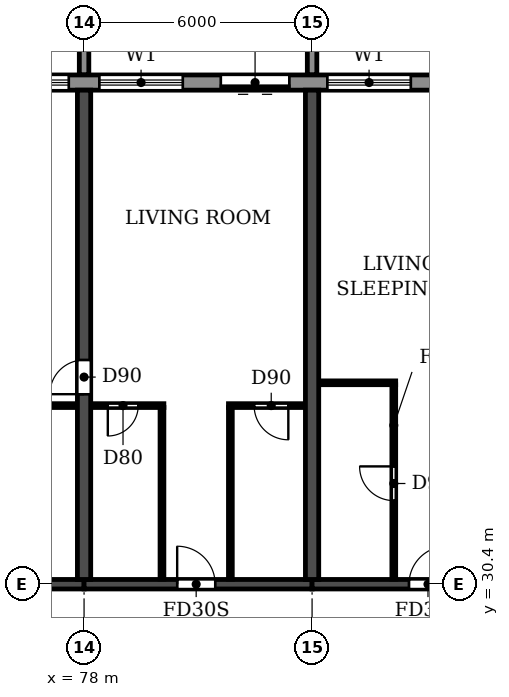
"""IFC4 building model, lengths in metres.
Left out: names, types, materials, properties, quantities, classifications, styles, units other than length and angle.
Written with IfcOpenShell. Run it as: python <this file> out.ifc"""

import sys

from ifc_helpers import new_model, si_unit, direction, frame, frame_2d, origin, place, context, subcontext, project, spatial, polyline, rectangle, outline, extrude, source, transform, mapped, element, fill, save


model = new_model("IFC4")
c1 = context("Model", 3, precision=1e-05, world=origin(), true_north=direction((0.0, 1.0)))
c2 = subcontext(c1, "Body", "Model", "MODEL_VIEW")
j1 = project(units=[si_unit("LENGTHUNIT", "METRE"), si_unit("PLANEANGLEUNIT", "RADIAN")], contexts=[c1])
p1 = place(None, origin())
s1 = spatial("IfcSite", under=j1, at=p1, CompositionType="ELEMENT")
p2 = place(p1, origin())
s2 = spatial("IfcBuilding", under=s1, at=p2, CompositionType="ELEMENT")
p3 = place(p2, frame((0.0, 0.0, 76.2)))
s3 = spatial("IfcBuildingStorey", under=s2, at=p3, CompositionType="ELEMENT", Elevation=76.2)
p4 = place(p3, frame((78.0, 30.525, 0.0), z_axis=(0.0, 0.0, 1.0), x_axis=(0.0, 1.0, 0.0)))
e1 = element("IfcWall", 1, at=p4, inside=s3, PredefinedType="SHEAR", context=c2, shape_type="SweptSolid", body=[
    extrude(rectangle(XDim=12.875, YDim=0.35, at=frame_2d((6.438, 0.0))), origin(), (0.0, 0.0, 1.0), 3.06),
])
p5 = place(p4, frame((4.875, 0.0, 0.0)))
e2 = element("IfcOpeningElement", 2, at=p5, cuts=e1, PredefinedType="OPENING", context=c2, shape_type="SweptSolid", body=[
    extrude(rectangle(XDim=0.9, YDim=2.1, at=frame_2d((0.45, 1.05))), frame((0.0, 0.185, 0.0), z_axis=(0.0, -1.0, 0.0), x_axis=(1.0, 0.0, 0.0)), (0.0, 0.0, 1.0), 0.37),
])
p6 = place(p3, frame((84.0, 30.525, 0.0), z_axis=(0.0, 0.0, 1.0), x_axis=(0.0, 1.0, 0.0)))
e3 = element("IfcWall", 3, at=p6, inside=s3, PredefinedType="SHEAR", context=c2, shape_type="SweptSolid", body=[
    extrude(rectangle(XDim=12.875, YDim=0.35, at=frame_2d((6.438, 0.0))), origin(), (0.0, 0.0, 1.0), 3.06),
])
p7 = place(p3, frame((72.0, 30.4, 0.0), z_axis=(0.0, 0.0, 1.0), x_axis=(1.0, 0.0, 0.0)))
e4 = element("IfcWall", 4, at=p7, inside=s3, PredefinedType="SHEAR", context=c2, shape_type="SweptSolid", body=[
    extrude(rectangle(XDim=6.0, YDim=0.25, at=frame_2d((3.0, 0.0))), origin(), (0.0, 0.0, 1.0), 2.46),
])
p8 = place(p3, frame((78.0, 30.4, 0.0), z_axis=(0.0, 0.0, 1.0), x_axis=(1.0, 0.0, 0.0)))
e5 = element("IfcWall", 5, at=p8, inside=s3, PredefinedType="SHEAR", context=c2, shape_type="SweptSolid", body=[
    extrude(rectangle(XDim=6.0, YDim=0.25, at=frame_2d((3.0, 0.0))), origin(), (0.0, 0.0, 1.0), 2.46),
])
p9 = place(p8, frame((2.45, 0.0, 0.0)))
e6 = element("IfcOpeningElement", 6, at=p9, cuts=e5, PredefinedType="OPENING", context=c2, shape_type="SweptSolid", body=[
    extrude(rectangle(XDim=1.0, YDim=2.1, at=frame_2d((0.5, 1.05))), frame((0.0, 0.135, 0.0), z_axis=(0.0, -1.0, 0.0), x_axis=(1.0, 0.0, 0.0)), (0.0, 0.0, 1.0), 0.27),
])
p10 = place(p3, frame((84.0, 30.4, 0.0), z_axis=(0.0, 0.0, 1.0), x_axis=(1.0, 0.0, 0.0)))
e7 = element("IfcWall", 7, at=p10, inside=s3, PredefinedType="SHEAR", context=c2, shape_type="SweptSolid", body=[
    extrude(rectangle(XDim=6.0, YDim=0.25, at=frame_2d((3.0, 0.0))), origin(), (0.0, 0.0, 1.0), 2.46),
])
p11 = place(p10, frame((2.55, 0.0, 0.0)))
e8 = element("IfcOpeningElement", 8, at=p11, cuts=e7, PredefinedType="OPENING", context=c2, shape_type="SweptSolid", body=[
    extrude(rectangle(XDim=1.0, YDim=2.1, at=frame_2d((0.5, 1.05))), frame((0.0, 0.135, 0.0), z_axis=(0.0, -1.0, 0.0), x_axis=(1.0, 0.0, 0.0)), (0.0, 0.0, 1.0), 0.27),
])
p12 = place(p3, frame((91.317, 43.6, 0.0), z_axis=(0.0, 0.0, 1.0), x_axis=(-1.0, 0.0, 0.0)))
e9 = element("IfcWall", 9, at=p12, inside=s3, PredefinedType="STANDARD", context=c2, shape_type="SweptSolid", body=[
    extrude(rectangle(XDim=80.634, YDim=0.4, at=frame_2d((40.317, 0.0))), origin(), (0.0, 0.0, 1.0), 3.06),
])
p13 = place(p12, frame((76.717, 0.0, 0.9)))
e10 = element("IfcOpeningElement", 10, at=p13, cuts=e9, PredefinedType="OPENING", context=c2, shape_type="SweptSolid", body=[
    extrude(rectangle(XDim=2.2, YDim=1.5, at=frame_2d((1.1, 0.75))), frame((0.0, 0.21, 0.0), z_axis=(0.0, -1.0, 0.0), x_axis=(1.0, 0.0, 0.0)), (0.0, 0.0, 1.0), 0.42),
])
p14 = place(p12, frame((73.917, 0.0, 0.0)))
e11 = element("IfcOpeningElement", 11, at=p14, cuts=e9, PredefinedType="OPENING", context=c2, shape_type="SweptSolid", body=[
    extrude(rectangle(XDim=1.8, YDim=2.4, at=frame_2d((0.9, 1.2))), frame((0.0, 0.21, 0.0), z_axis=(0.0, -1.0, 0.0), x_axis=(1.0, 0.0, 0.0)), (0.0, 0.0, 1.0), 0.42),
])
p15 = place(p12, frame((70.917, 0.0, 0.0)))
e12 = element("IfcOpeningElement", 12, at=p15, cuts=e9, PredefinedType="OPENING", context=c2, shape_type="SweptSolid", body=[
    extrude(rectangle(XDim=1.8, YDim=2.4, at=frame_2d((0.9, 1.2))), frame((0.0, 0.21, 0.0), z_axis=(0.0, -1.0, 0.0), x_axis=(1.0, 0.0, 0.0)), (0.0, 0.0, 1.0), 0.42),
])
p16 = place(p12, frame((67.717, 0.0, 0.9)))
e13 = element("IfcOpeningElement", 13, at=p16, cuts=e9, PredefinedType="OPENING", context=c2, shape_type="SweptSolid", body=[
    extrude(rectangle(XDim=2.2, YDim=1.5, at=frame_2d((1.1, 0.75))), frame((0.0, 0.21, 0.0), z_axis=(0.0, -1.0, 0.0), x_axis=(1.0, 0.0, 0.0)), (0.0, 0.0, 1.0), 0.42),
])
p17 = place(p12, frame((64.717, 0.0, 0.9)))
e14 = element("IfcOpeningElement", 14, at=p17, cuts=e9, PredefinedType="OPENING", context=c2, shape_type="SweptSolid", body=[
    extrude(rectangle(XDim=2.2, YDim=1.5, at=frame_2d((1.1, 0.75))), frame((0.0, 0.21, 0.0), z_axis=(0.0, -1.0, 0.0), x_axis=(1.0, 0.0, 0.0)), (0.0, 0.0, 1.0), 0.42),
])
p18 = place(p12, frame((61.917, 0.0, 0.0)))
e15 = element("IfcOpeningElement", 15, at=p18, cuts=e9, PredefinedType="OPENING", context=c2, shape_type="SweptSolid", body=[
    extrude(rectangle(XDim=1.8, YDim=2.4, at=frame_2d((0.9, 1.2))), frame((0.0, 0.21, 0.0), z_axis=(0.0, -1.0, 0.0), x_axis=(1.0, 0.0, 0.0)), (0.0, 0.0, 1.0), 0.42),
])
p19 = place(p12, frame((58.717, 0.0, 0.9)))
e16 = element("IfcOpeningElement", 16, at=p19, cuts=e9, PredefinedType="OPENING", context=c2, shape_type="SweptSolid", body=[
    extrude(rectangle(XDim=2.2, YDim=1.5, at=frame_2d((1.1, 0.75))), frame((0.0, 0.21, 0.0), z_axis=(0.0, -1.0, 0.0), x_axis=(1.0, 0.0, 0.0)), (0.0, 0.0, 1.0), 0.42),
])
p20 = place(p12, frame((55.917, 0.0, 0.0)))
e17 = element("IfcOpeningElement", 17, at=p20, cuts=e9, PredefinedType="OPENING", context=c2, shape_type="SweptSolid", body=[
    extrude(rectangle(XDim=1.8, YDim=2.4, at=frame_2d((0.9, 1.2))), frame((0.0, 0.21, 0.0), z_axis=(0.0, -1.0, 0.0), x_axis=(1.0, 0.0, 0.0)), (0.0, 0.0, 1.0), 0.42),
])
p21 = place(p12, frame((52.717, 0.0, 0.9)))
e18 = element("IfcOpeningElement", 18, at=p21, cuts=e9, PredefinedType="OPENING", context=c2, shape_type="SweptSolid", body=[
    extrude(rectangle(XDim=2.2, YDim=1.5, at=frame_2d((1.1, 0.75))), frame((0.0, 0.21, 0.0), z_axis=(0.0, -1.0, 0.0), x_axis=(1.0, 0.0, 0.0)), (0.0, 0.0, 1.0), 0.42),
])
p22 = place(p12, frame((49.717, 0.0, 0.9)))
e19 = element("IfcOpeningElement", 19, at=p22, cuts=e9, PredefinedType="OPENING", context=c2, shape_type="SweptSolid", body=[
    extrude(rectangle(XDim=2.2, YDim=1.5, at=frame_2d((1.1, 0.75))), frame((0.0, 0.21, 0.0), z_axis=(0.0, -1.0, 0.0), x_axis=(1.0, 0.0, 0.0)), (0.0, 0.0, 1.0), 0.42),
])
p23 = place(p12, frame((46.917, 0.0, 0.0)))
e20 = element("IfcOpeningElement", 20, at=p23, cuts=e9, PredefinedType="OPENING", context=c2, shape_type="SweptSolid", body=[
    extrude(rectangle(XDim=1.8, YDim=2.4, at=frame_2d((0.9, 1.2))), frame((0.0, 0.21, 0.0), z_axis=(0.0, -1.0, 0.0), x_axis=(1.0, 0.0, 0.0)), (0.0, 0.0, 1.0), 0.42),
])
p24 = place(p12, frame((43.717, 0.0, 0.9)))
e21 = element("IfcOpeningElement", 21, at=p24, cuts=e9, PredefinedType="OPENING", context=c2, shape_type="SweptSolid", body=[
    extrude(rectangle(XDim=2.2, YDim=1.5, at=frame_2d((1.1, 0.75))), frame((0.0, 0.21, 0.0), z_axis=(0.0, -1.0, 0.0), x_axis=(1.0, 0.0, 0.0)), (0.0, 0.0, 1.0), 0.42),
])
p25 = place(p12, frame((40.717, 0.0, 0.9)))
e22 = element("IfcOpeningElement", 22, at=p25, cuts=e9, PredefinedType="OPENING", context=c2, shape_type="SweptSolid", body=[
    extrude(rectangle(XDim=2.2, YDim=1.5, at=frame_2d((1.1, 0.75))), frame((0.0, 0.21, 0.0), z_axis=(0.0, -1.0, 0.0), x_axis=(1.0, 0.0, 0.0)), (0.0, 0.0, 1.0), 0.42),
])
p26 = place(p12, frame((37.917, 0.0, 0.0)))
e23 = element("IfcOpeningElement", 23, at=p26, cuts=e9, PredefinedType="OPENING", context=c2, shape_type="SweptSolid", body=[
    extrude(rectangle(XDim=1.8, YDim=2.4, at=frame_2d((0.9, 1.2))), frame((0.0, 0.21, 0.0), z_axis=(0.0, -1.0, 0.0), x_axis=(1.0, 0.0, 0.0)), (0.0, 0.0, 1.0), 0.42),
])
p27 = place(p12, frame((34.717, 0.0, 0.9)))
e24 = element("IfcOpeningElement", 24, at=p27, cuts=e9, PredefinedType="OPENING", context=c2, shape_type="SweptSolid", body=[
    extrude(rectangle(XDim=2.2, YDim=1.5, at=frame_2d((1.1, 0.75))), frame((0.0, 0.21, 0.0), z_axis=(0.0, -1.0, 0.0), x_axis=(1.0, 0.0, 0.0)), (0.0, 0.0, 1.0), 0.42),
])
p28 = place(p12, frame((31.917, 0.0, 0.0)))
e25 = element("IfcOpeningElement", 25, at=p28, cuts=e9, PredefinedType="OPENING", context=c2, shape_type="SweptSolid", body=[
    extrude(rectangle(XDim=1.8, YDim=2.4, at=frame_2d((0.9, 1.2))), frame((0.0, 0.21, 0.0), z_axis=(0.0, -1.0, 0.0), x_axis=(1.0, 0.0, 0.0)), (0.0, 0.0, 1.0), 0.42),
])
p29 = place(p12, frame((28.717, 0.0, 0.9)))
e26 = element("IfcOpeningElement", 26, at=p29, cuts=e9, PredefinedType="OPENING", context=c2, shape_type="SweptSolid", body=[
    extrude(rectangle(XDim=2.2, YDim=1.5, at=frame_2d((1.1, 0.75))), frame((0.0, 0.21, 0.0), z_axis=(0.0, -1.0, 0.0), x_axis=(1.0, 0.0, 0.0)), (0.0, 0.0, 1.0), 0.42),
])
p30 = place(p12, frame((25.717, 0.0, 0.9)))
e27 = element("IfcOpeningElement", 27, at=p30, cuts=e9, PredefinedType="OPENING", context=c2, shape_type="SweptSolid", body=[
    extrude(rectangle(XDim=2.2, YDim=1.5, at=frame_2d((1.1, 0.75))), frame((0.0, 0.21, 0.0), z_axis=(0.0, -1.0, 0.0), x_axis=(1.0, 0.0, 0.0)), (0.0, 0.0, 1.0), 0.42),
])
p31 = place(p12, frame((22.717, 0.0, 0.9)))
e28 = element("IfcOpeningElement", 28, at=p31, cuts=e9, PredefinedType="OPENING", context=c2, shape_type="SweptSolid", body=[
    extrude(rectangle(XDim=2.2, YDim=1.5, at=frame_2d((1.1, 0.75))), frame((0.0, 0.21, 0.0), z_axis=(0.0, -1.0, 0.0), x_axis=(1.0, 0.0, 0.0)), (0.0, 0.0, 1.0), 0.42),
])
p32 = place(p12, frame((19.917, 0.0, 0.0)))
e29 = element("IfcOpeningElement", 29, at=p32, cuts=e9, PredefinedType="OPENING", context=c2, shape_type="SweptSolid", body=[
    extrude(rectangle(XDim=1.8, YDim=2.4, at=frame_2d((0.9, 1.2))), frame((0.0, 0.21, 0.0), z_axis=(0.0, -1.0, 0.0), x_axis=(1.0, 0.0, 0.0)), (0.0, 0.0, 1.0), 0.42),
])
p33 = place(p12, frame((16.717, 0.0, 0.9)))
e30 = element("IfcOpeningElement", 30, at=p33, cuts=e9, PredefinedType="OPENING", context=c2, shape_type="SweptSolid", body=[
    extrude(rectangle(XDim=2.2, YDim=1.5, at=frame_2d((1.1, 0.75))), frame((0.0, 0.21, 0.0), z_axis=(0.0, -1.0, 0.0), x_axis=(1.0, 0.0, 0.0)), (0.0, 0.0, 1.0), 0.42),
])
p34 = place(p12, frame((13.717, 0.0, 0.9)))
e31 = element("IfcOpeningElement", 31, at=p34, cuts=e9, PredefinedType="OPENING", context=c2, shape_type="SweptSolid", body=[
    extrude(rectangle(XDim=2.2, YDim=1.5, at=frame_2d((1.1, 0.75))), frame((0.0, 0.21, 0.0), z_axis=(0.0, -1.0, 0.0), x_axis=(1.0, 0.0, 0.0)), (0.0, 0.0, 1.0), 0.42),
])
p35 = place(p12, frame((10.717, 0.0, 0.9)))
e32 = element("IfcOpeningElement", 32, at=p35, cuts=e9, PredefinedType="OPENING", context=c2, shape_type="SweptSolid", body=[
    extrude(rectangle(XDim=2.2, YDim=1.5, at=frame_2d((1.1, 0.75))), frame((0.0, 0.21, 0.0), z_axis=(0.0, -1.0, 0.0), x_axis=(1.0, 0.0, 0.0)), (0.0, 0.0, 1.0), 0.42),
])
p36 = place(p12, frame((7.917, 0.0, 0.0)))
e33 = element("IfcOpeningElement", 33, at=p36, cuts=e9, PredefinedType="OPENING", context=c2, shape_type="SweptSolid", body=[
    extrude(rectangle(XDim=1.8, YDim=2.4, at=frame_2d((0.9, 1.2))), frame((0.0, 0.21, 0.0), z_axis=(0.0, -1.0, 0.0), x_axis=(1.0, 0.0, 0.0)), (0.0, 0.0, 1.0), 0.42),
])
p37 = place(p12, frame((4.717, 0.0, 0.9)))
e34 = element("IfcOpeningElement", 34, at=p37, cuts=e9, PredefinedType="OPENING", context=c2, shape_type="SweptSolid", body=[
    extrude(rectangle(XDim=2.2, YDim=1.5, at=frame_2d((1.1, 0.75))), frame((0.0, 0.21, 0.0), z_axis=(0.0, -1.0, 0.0), x_axis=(1.0, 0.0, 0.0)), (0.0, 0.0, 1.0), 0.42),
])
p38 = place(p12, frame((1.917, 0.0, 0.0)))
e35 = element("IfcOpeningElement", 35, at=p38, cuts=e9, PredefinedType="OPENING", context=c2, shape_type="SweptSolid", body=[
    extrude(rectangle(XDim=1.8, YDim=2.4, at=frame_2d((0.9, 1.2))), frame((0.0, 0.21, 0.0), z_axis=(0.0, -1.0, 0.0), x_axis=(1.0, 0.0, 0.0)), (0.0, 0.0, 1.0), 0.42),
])
m1 = source(origin(), c2, "Body", "SweptSolid", [
    extrude(outline(polyline([(0.0, 0.0), (0.25, 0.0), (0.25, 3.1), (0.0, 3.1), (0.0, 0.0)])), origin(), (0.0, 0.0, 1.0), 3.1),
])
for number, where in (
    (36, (77.875, 43.8, 0.0)),
    (37, (83.875, 43.8, 0.0)),
):
    element("IfcWall", number, at=place(p3, frame(where)), inside=s3, PredefinedType="STANDARD", context=c2, shape_type="MappedRepresentation", body=[
        mapped(m1, transform((0.0, 0.0, 0.0))),
    ])
p39 = place(p3, frame((75.1, 35.1, 0.0), z_axis=(0.0, 0.0, 1.0), x_axis=(1.0, 0.0, 0.0)))
e38 = element("IfcWall", 38, at=p39, inside=s3, PredefinedType="PARTITIONING", context=c2, shape_type="SweptSolid", body=[
    extrude(rectangle(XDim=2.715, YDim=0.1, at=frame_2d((1.357, 0.0))), origin(), (0.0, 0.0, 1.0), 3.06),
])
p40 = place(p39, frame((1.0, 0.0, 0.0)))
e39 = element("IfcOpeningElement", 39, at=p40, cuts=e38, PredefinedType="OPENING", context=c2, shape_type="SweptSolid", body=[
    extrude(rectangle(XDim=0.8, YDim=2.1, at=frame_2d((0.4, 1.05))), frame((0.0, 0.06, 0.0), z_axis=(0.0, -1.0, 0.0), x_axis=(1.0, 0.0, 0.0)), (0.0, 0.0, 1.0), 0.12),
])
p41 = place(p3, frame((78.185, 35.1, 0.0), z_axis=(0.0, 0.0, 1.0), x_axis=(1.0, 0.0, 0.0)))
e40 = element("IfcWall", 40, at=p41, inside=s3, PredefinedType="PARTITIONING", context=c2, shape_type="SweptSolid", body=[
    extrude(rectangle(XDim=1.915, YDim=0.1, at=frame_2d((0.958, 0.0))), origin(), (0.0, 0.0, 1.0), 3.06),
])
p42 = place(p41, frame((0.44, 0.0, 0.0)))
e41 = element("IfcOpeningElement", 41, at=p42, cuts=e40, PredefinedType="OPENING", context=c2, shape_type="SweptSolid", body=[
    extrude(rectangle(XDim=0.8, YDim=2.1, at=frame_2d((0.4, 1.05))), frame((0.0, 0.06, 0.0), z_axis=(0.0, -1.0, 0.0), x_axis=(1.0, 0.0, 0.0)), (0.0, 0.0, 1.0), 0.12),
])
p43 = place(p3, frame((81.8, 35.1, 0.0), z_axis=(0.0, 0.0, 1.0), x_axis=(1.0, 0.0, 0.0)))
e42 = element("IfcWall", 42, at=p43, inside=s3, PredefinedType="PARTITIONING", context=c2, shape_type="SweptSolid", body=[
    extrude(rectangle(XDim=2.015, YDim=0.1, at=frame_2d((1.007, 0.0))), origin(), (0.0, 0.0, 1.0), 3.06),
])
p44 = place(p43, frame((0.675, 0.0, 0.0)))
e43 = element("IfcOpeningElement", 43, at=p44, cuts=e42, PredefinedType="OPENING", context=c2, shape_type="SweptSolid", body=[
    extrude(rectangle(XDim=0.9, YDim=2.1, at=frame_2d((0.45, 1.05))), frame((0.0, 0.06, 0.0), z_axis=(0.0, -1.0, 0.0), x_axis=(1.0, 0.0, 0.0)), (0.0, 0.0, 1.0), 0.12),
])
p45 = place(p3, frame((84.185, 35.7, 0.0), z_axis=(0.0, 0.0, 1.0), x_axis=(1.0, 0.0, 0.0)))
e44 = element("IfcWall", 44, at=p45, inside=s3, PredefinedType="PARTITIONING", context=c2, shape_type="SweptSolid", body=[
    extrude(rectangle(XDim=2.015, YDim=0.1, at=frame_2d((1.007, 0.0))), origin(), (0.0, 0.0, 1.0), 3.06),
])
for number, where, z_axis, x_axis in (
    (45, (80.05, 30.535, 0.0), (0.0, 0.0, 1.0), (0.0, 1.0, 0.0)),
    (46, (81.85, 30.535, 0.0), (0.0, 0.0, 1.0), (0.0, 1.0, 0.0)),
):
    element("IfcWall", number, at=place(p3, frame(where, z_axis=z_axis, x_axis=x_axis)), inside=s3, PredefinedType="PARTITIONING", context=c2, shape_type="SweptSolid", body=[
        extrude(rectangle(XDim=4.515, YDim=0.1, at=frame_2d((2.258, 0.0))), origin(), (0.0, 0.0, 1.0), 3.06),
    ])
p46 = place(p3, frame((86.15, 30.535, 0.0), z_axis=(0.0, 0.0, 1.0), x_axis=(0.0, 1.0, 0.0)))
e47 = element("IfcWall", 47, at=p46, inside=s3, PredefinedType="PARTITIONING", context=c2, shape_type="SweptSolid", body=[
    extrude(rectangle(XDim=5.115, YDim=0.1, at=frame_2d((2.558, 0.0))), origin(), (0.0, 0.0, 1.0), 3.06),
])
p47 = place(p46, frame((2.065, 0.0, 0.0)))
e48 = element("IfcOpeningElement", 48, at=p47, cuts=e47, PredefinedType="OPENING", context=c2, shape_type="SweptSolid", body=[
    extrude(rectangle(XDim=0.9, YDim=2.1, at=frame_2d((0.45, 1.05))), frame((0.0, 0.06, 0.0), z_axis=(0.0, -1.0, 0.0), x_axis=(1.0, 0.0, 0.0)), (0.0, 0.0, 1.0), 0.12),
])
p48 = place(p34, origin())
e49 = element("IfcWindow", 49, at=p48, inside=s3, PartitioningType="DOUBLE_PANEL_HORIZONTAL", PredefinedType="WINDOW", context=c2, shape_type="SweptSolid", body=[
    extrude(rectangle(XDim=2.2, YDim=1.5, at=frame_2d((1.1, 0.75))), frame((0.0, 0.03, 0.0), z_axis=(0.0, -1.0, 0.0), x_axis=(1.0, 0.0, 0.0)), (0.0, 0.0, 1.0), 0.06),
])
fill(e31, e49)
p49 = place(p35, origin())
e50 = element("IfcWindow", 50, at=p49, inside=s3, PartitioningType="DOUBLE_PANEL_HORIZONTAL", PredefinedType="WINDOW", context=c2, shape_type="SweptSolid", body=[
    extrude(rectangle(XDim=2.2, YDim=1.5, at=frame_2d((1.1, 0.75))), frame((0.0, 0.03, 0.0), z_axis=(0.0, -1.0, 0.0), x_axis=(1.0, 0.0, 0.0)), (0.0, 0.0, 1.0), 0.06),
])
fill(e32, e50)
p50 = place(p36, origin())
e51 = element("IfcDoor", 51, at=p50, inside=s3, OperationType="DOUBLE_DOOR_SLIDING", PredefinedType="DOOR", context=c2, shape_type="SweptSolid", body=[
    extrude(rectangle(XDim=1.8, YDim=2.4, at=frame_2d((0.9, 1.2))), frame((0.0, 0.025, 0.0), z_axis=(0.0, -1.0, 0.0), x_axis=(1.0, 0.0, 0.0)), (0.0, 0.0, 1.0), 0.05),
])
fill(e33, e51)
p51 = place(p37, origin())
e52 = element("IfcWindow", 52, at=p51, inside=s3, PartitioningType="DOUBLE_PANEL_HORIZONTAL", PredefinedType="WINDOW", context=c2, shape_type="SweptSolid", body=[
    extrude(rectangle(XDim=2.2, YDim=1.5, at=frame_2d((1.1, 0.75))), frame((0.0, 0.03, 0.0), z_axis=(0.0, -1.0, 0.0), x_axis=(1.0, 0.0, 0.0)), (0.0, 0.0, 1.0), 0.06),
])
fill(e34, e52)
p52 = place(p5, origin())
e53 = element("IfcDoor", 53, at=p52, inside=s3, OperationType="SINGLE_SWING_LEFT", PredefinedType="DOOR", context=c2, shape_type="SweptSolid", body=[
    extrude(rectangle(XDim=0.9, YDim=2.1, at=frame_2d((0.45, 1.05))), frame((0.0, 0.025, 0.0), z_axis=(0.0, -1.0, 0.0), x_axis=(1.0, 0.0, 0.0)), (0.0, 0.0, 1.0), 0.05),
])
fill(e2, e53)
p53 = place(p42, frame((0.8, 0.0, 0.0), z_axis=(0.0, 0.0, 1.0), x_axis=(-1.0, 0.0, 0.0)))
e54 = element("IfcDoor", 54, at=p53, inside=s3, OperationType="SINGLE_SWING_RIGHT", PredefinedType="DOOR", context=c2, shape_type="SweptSolid", body=[
    extrude(rectangle(XDim=0.8, YDim=2.1, at=frame_2d((0.4, 1.05))), frame((0.0, 0.025, 0.0), z_axis=(0.0, -1.0, 0.0), x_axis=(1.0, 0.0, 0.0)), (0.0, 0.0, 1.0), 0.05),
])
fill(e41, e54)
p54 = place(p9, origin())
e55 = element("IfcDoor", 55, at=p54, inside=s3, OperationType="SINGLE_SWING_LEFT", PredefinedType="DOOR", context=c2, shape_type="SweptSolid", body=[
    extrude(rectangle(XDim=1.0, YDim=2.1, at=frame_2d((0.5, 1.05))), frame((0.0, 0.025, 0.0), z_axis=(0.0, -1.0, 0.0), x_axis=(1.0, 0.0, 0.0)), (0.0, 0.0, 1.0), 0.05),
])
fill(e6, e55)
p55 = place(p44, frame((0.9, 0.0, 0.0), z_axis=(0.0, 0.0, 1.0), x_axis=(-1.0, 0.0, 0.0)))
e56 = element("IfcDoor", 56, at=p55, inside=s3, OperationType="SINGLE_SWING_LEFT", PredefinedType="DOOR", context=c2, shape_type="SweptSolid", body=[
    extrude(rectangle(XDim=0.9, YDim=2.1, at=frame_2d((0.45, 1.05))), frame((0.0, 0.025, 0.0), z_axis=(0.0, -1.0, 0.0), x_axis=(1.0, 0.0, 0.0)), (0.0, 0.0, 1.0), 0.05),
])
fill(e43, e56)
p56 = place(p47, origin())
e57 = element("IfcDoor", 57, at=p56, inside=s3, OperationType="SINGLE_SWING_RIGHT", PredefinedType="DOOR", context=c2, shape_type="SweptSolid", body=[
    extrude(rectangle(XDim=0.9, YDim=2.1, at=frame_2d((0.45, 1.05))), frame((0.0, 0.025, 0.0), z_axis=(0.0, -1.0, 0.0), x_axis=(1.0, 0.0, 0.0)), (0.0, 0.0, 1.0), 0.05),
])
fill(e48, e57)
p57 = place(p11, origin())
e58 = element("IfcDoor", 58, at=p57, inside=s3, OperationType="SINGLE_SWING_RIGHT", PredefinedType="DOOR", context=c2, shape_type="SweptSolid", body=[
    extrude(rectangle(XDim=1.0, YDim=2.1, at=frame_2d((0.5, 1.05))), frame((0.0, 0.025, 0.0), z_axis=(0.0, -1.0, 0.0), x_axis=(1.0, 0.0, 0.0)), (0.0, 0.0, 1.0), 0.05),
])
fill(e8, e58)
save(model, sys.argv[1])
